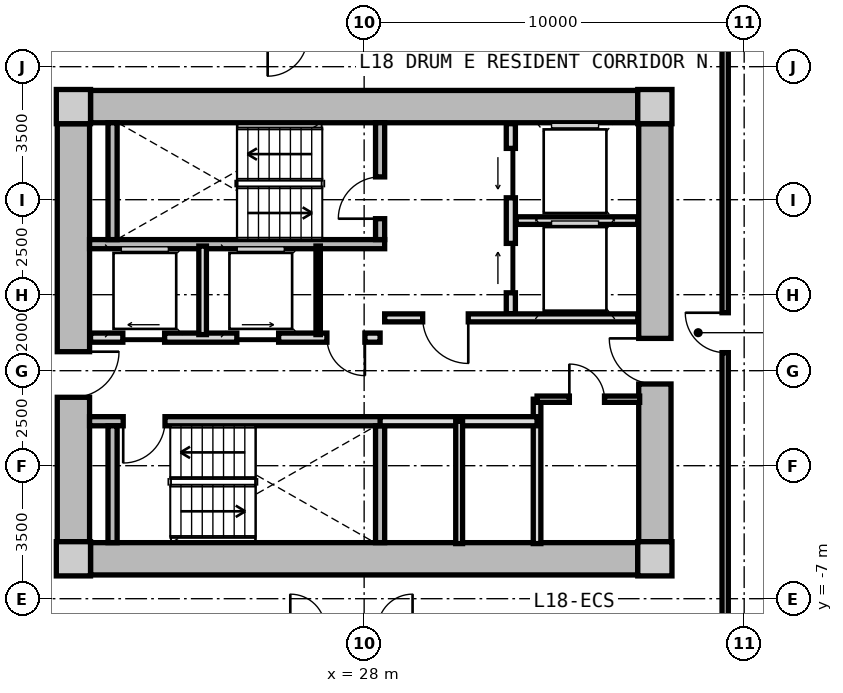
"""IFC4 building model, lengths in metres.
Left out: names, types, materials, properties, quantities, classifications, styles, units other than length and angle.
Written with IfcOpenShell. Run it as: python <this file> out.ifc"""

import sys

from ifc_helpers import new_model, si_unit, direction, frame, frame_2d, origin, origin_2d, place, context, subcontext, project, spatial, rectangle, extrude, source, transform, mapped, element, fill, save


model = new_model("IFC4")
c1 = context("Model", 3, precision=1e-05, world=origin(), true_north=direction((0.0, 1.0)))
c2 = subcontext(c1, "Body", "Model", "MODEL_VIEW")
j1 = project(units=[si_unit("LENGTHUNIT", "METRE"), si_unit("PLANEANGLEUNIT", "RADIAN")], contexts=[c1])
p1 = place(None, origin())
s1 = spatial("IfcSite", under=j1, at=p1, CompositionType="ELEMENT")
p2 = place(p1, origin())
s2 = spatial("IfcBuilding", under=s1, at=p2, CompositionType="ELEMENT")
p3 = place(p2, frame((0.0, 0.0, 61.25)))
s3 = spatial("IfcBuildingStorey", under=s2, at=p3, CompositionType="ELEMENT", Elevation=61.25)
m1 = source(origin(), c2, "Body", "SweptSolid", [
    extrude(rectangle(XDim=0.9, YDim=0.9, at=origin_2d()), origin(), (0.0, 0.0, 1.0), 3.05),
])
for number, where, z_axis, x_axis in (
    (1, (20.35, -5.95, 0.0), (0.0, 0.0, 1.0), (1.0, 0.0, 0.0)),
    (2, (35.65, -5.95, 0.0), (0.0, 0.0, 1.0), (1.0, 0.0, 0.0)),
    (3, (35.65, 5.95, 0.0), (0.0, 0.0, 1.0), (1.0, 0.0, 0.0)),
    (4, (20.35, 5.95, 0.0), (0.0, 0.0, 1.0), (1.0, 0.0, 0.0)),
):
    element("IfcColumn", number, at=place(p3, frame(where, z_axis=z_axis, x_axis=x_axis)), inside=s3, PredefinedType="COLUMN", context=c2, shape_type="MappedRepresentation", body=[
        mapped(m1, transform((0.0, 0.0, 0.0), x_axis=(1.0, 0.0, 0.0), y_axis=(0.0, 1.0, 0.0), z_axis=(0.0, 0.0, 1.0), scale=1.0)),
    ])
m2 = source(origin(), c2, "Body", "SweptSolid", [
    extrude(rectangle(XDim=14.4, YDim=0.85, at=frame_2d((7.2, 0.0))), origin(), (0.0, 0.0, 1.0), 2.79),
])
for number, where, z_axis, x_axis in (
    (5, (20.8, 5.95, 0.0), (0.0, 0.0, 1.0), (1.0, 0.0, 0.0)),
    (6, (35.2, -5.95, 0.0), (0.0, 0.0, 1.0), (-1.0, 0.0, 0.0)),
):
    element("IfcWall", number, at=place(p3, frame(where, z_axis=z_axis, x_axis=x_axis)), inside=s3, PredefinedType="SHEAR", context=c2, shape_type="MappedRepresentation", body=[
        mapped(m2, transform((0.0, 0.0, 0.0), x_axis=(1.0, 0.0, 0.0), y_axis=(0.0, 1.0, 0.0), z_axis=(0.0, 0.0, 1.0), scale=1.0)),
    ])
m3 = source(origin(), c2, "Body", "SweptSolid", [
    extrude(rectangle(XDim=11.0, YDim=0.85, at=frame_2d((5.5, 0.0))), origin(), (0.0, 0.0, 1.0), 2.79),
])
p4 = place(p3, frame((20.35, -5.5, 0.0), z_axis=(0.0, 0.0, 1.0), x_axis=(0.0, 1.0, 0.0)))
e7 = element("IfcWall", 7, at=p4, inside=s3, PredefinedType="SHEAR", context=c2, shape_type="MappedRepresentation", body=[
    mapped(m3, transform((0.0, 0.0, 0.0), x_axis=(1.0, 0.0, 0.0), y_axis=(0.0, 1.0, 0.0), z_axis=(0.0, 0.0, 1.0), scale=1.0)),
])
p5 = place(p4, frame((3.8, 0.0, 0.0)))
e8 = element("IfcOpeningElement", 8, at=p5, cuts=e7, PredefinedType="OPENING", context=c2, shape_type="SweptSolid", body=[
    extrude(rectangle(XDim=1.2, YDim=2.15, at=frame_2d((0.6, 1.075))), frame((0.0, 0.435, 0.0), z_axis=(0.0, -1.0, 0.0), x_axis=(1.0, 0.0, 0.0)), (0.0, 0.0, 1.0), 0.87),
])
p6 = place(p3, frame((35.65, 5.5, 0.0), z_axis=(0.0, 0.0, 1.0), x_axis=(0.0, -1.0, 0.0)))
e9 = element("IfcWall", 9, at=p6, inside=s3, PredefinedType="SHEAR", context=c2, shape_type="MappedRepresentation", body=[
    mapped(m3, transform((0.0, 0.0, 0.0), x_axis=(1.0, 0.0, 0.0), y_axis=(0.0, 1.0, 0.0), z_axis=(0.0, 0.0, 1.0), scale=1.0)),
])
p7 = place(p6, frame((5.65, 0.0, 0.0)))
e10 = element("IfcOpeningElement", 10, at=p7, cuts=e9, PredefinedType="OPENING", context=c2, shape_type="SweptSolid", body=[
    extrude(rectangle(XDim=1.2, YDim=2.15, at=frame_2d((0.6, 1.075))), frame((0.0, 0.435, 0.0), z_axis=(0.0, -1.0, 0.0), x_axis=(1.0, 0.0, 0.0)), (0.0, 0.0, 1.0), 0.87),
])
m4 = source(origin(), c2, "Body", "SweptSolid", [
    extrude(rectangle(XDim=7.765, YDim=0.24, at=frame_2d((3.883, 0.0))), origin(), (0.0, 0.0, 1.0), 2.79),
])
p8 = place(p3, frame((20.775, 2.33, 0.0), z_axis=(0.0, 0.0, 1.0), x_axis=(1.0, 0.0, 0.0)))
e11 = element("IfcWall", 11, at=p8, inside=s3, PredefinedType="PARTITIONING", context=c2, shape_type="MappedRepresentation", body=[
    mapped(m4, transform((0.0, 0.0, 0.0), x_axis=(1.0, 0.0, 0.0), y_axis=(0.0, 1.0, 0.0), z_axis=(0.0, 0.0, 1.0), scale=1.0)),
])
m5 = source(origin(), c2, "Body", "SweptSolid", [
    extrude(rectangle(XDim=3.075, YDim=0.24, at=frame_2d((1.538, 0.0))), origin(), (0.0, 0.0, 1.0), 2.79),
])
p9 = place(p3, frame((21.38, 2.45, 0.0), z_axis=(0.0, 0.0, 1.0), x_axis=(0.0, 1.0, 0.0)))
e12 = element("IfcWall", 12, at=p9, inside=s3, PredefinedType="PARTITIONING", context=c2, shape_type="MappedRepresentation", body=[
    mapped(m5, transform((0.0, 0.0, 0.0), x_axis=(1.0, 0.0, 0.0), y_axis=(0.0, 1.0, 0.0), z_axis=(0.0, 0.0, 1.0), scale=1.0)),
])
p10 = place(p3, frame((28.42, 2.45, 0.0), z_axis=(0.0, 0.0, 1.0), x_axis=(0.0, 1.0, 0.0)))
e13 = element("IfcWall", 13, at=p10, inside=s3, PredefinedType="PARTITIONING", context=c2, shape_type="MappedRepresentation", body=[
    mapped(m5, transform((0.0, 0.0, 0.0), x_axis=(1.0, 0.0, 0.0), y_axis=(0.0, 1.0, 0.0), z_axis=(0.0, 0.0, 1.0), scale=1.0)),
])
p11 = place(p10, frame((0.55, 0.0, 0.0)))
e14 = element("IfcOpeningElement", 14, at=p11, cuts=e13, PredefinedType="OPENING", context=c2, shape_type="SweptSolid", body=[
    extrude(rectangle(XDim=1.1, YDim=2.15, at=frame_2d((0.55, 1.075))), frame((0.0, 0.13, 0.0), z_axis=(0.0, -1.0, 0.0), x_axis=(1.0, 0.0, 0.0)), (0.0, 0.0, 1.0), 0.26),
])
p12 = place(p3, frame((20.775, -2.33, 0.0), z_axis=(0.0, 0.0, 1.0), x_axis=(1.0, 0.0, 0.0)))
e15 = element("IfcWall", 15, at=p12, inside=s3, PredefinedType="PARTITIONING", context=c2, shape_type="MappedRepresentation", body=[
    mapped(m4, transform((0.0, 0.0, 0.0), x_axis=(1.0, 0.0, 0.0), y_axis=(0.0, 1.0, 0.0), z_axis=(0.0, 0.0, 1.0), scale=1.0)),
])
p13 = place(p12, frame((0.885, 0.0, 0.0)))
e16 = element("IfcOpeningElement", 16, at=p13, cuts=e15, PredefinedType="OPENING", context=c2, shape_type="SweptSolid", body=[
    extrude(rectangle(XDim=1.1, YDim=2.15, at=frame_2d((0.55, 1.075))), frame((0.0, 0.13, 0.0), z_axis=(0.0, -1.0, 0.0), x_axis=(1.0, 0.0, 0.0)), (0.0, 0.0, 1.0), 0.26),
])
for number, where, z_axis, x_axis in (
    (17, (21.38, -5.525, 0.0), (0.0, 0.0, 1.0), (0.0, 1.0, 0.0)),
    (18, (28.42, -5.525, 0.0), (0.0, 0.0, 1.0), (0.0, 1.0, 0.0)),
):
    element("IfcWall", number, at=place(p3, frame(where, z_axis=z_axis, x_axis=x_axis)), inside=s3, PredefinedType="PARTITIONING", context=c2, shape_type="MappedRepresentation", body=[
        mapped(m5, transform((0.0, 0.0, 0.0), x_axis=(1.0, 0.0, 0.0), y_axis=(0.0, 1.0, 0.0), z_axis=(0.0, 0.0, 1.0), scale=1.0)),
    ])
m6 = source(origin(), c2, "Body", "SweptSolid", [
    extrude(rectangle(XDim=5.0, YDim=0.24, at=frame_2d((2.5, 0.0))), origin(), (0.0, 0.0, 1.0), 2.775),
])
p14 = place(p3, frame((31.86, 0.5, 0.0), z_axis=(0.0, 0.0, 1.0), x_axis=(0.0, 1.0, 0.0)))
e19 = element("IfcWall", 19, at=p14, inside=s3, PredefinedType="PARTITIONING", context=c2, shape_type="MappedRepresentation", body=[
    mapped(m6, transform((0.0, 0.0, 0.0), x_axis=(1.0, 0.0, 0.0), y_axis=(0.0, 1.0, 0.0), z_axis=(0.0, 0.0, 1.0), scale=1.0)),
])
p15 = place(p14, frame((3.05, 0.0, 0.0)))
e20 = element("IfcOpeningElement", 20, at=p15, cuts=e19, PredefinedType="OPENING", context=c2, shape_type="SweptSolid", body=[
    extrude(rectangle(XDim=1.3, YDim=2.2, at=frame_2d((0.65, 1.1))), frame((0.0, 0.13, 0.0), z_axis=(0.0, -1.0, 0.0), x_axis=(1.0, 0.0, 0.0)), (0.0, 0.0, 1.0), 0.26),
])
p16 = place(p14, frame((0.55, 0.0, 0.0)))
e21 = element("IfcOpeningElement", 21, at=p16, cuts=e19, PredefinedType="OPENING", context=c2, shape_type="SweptSolid", body=[
    extrude(rectangle(XDim=1.3, YDim=2.2, at=frame_2d((0.65, 1.1))), frame((0.0, 0.13, 0.0), z_axis=(0.0, -1.0, 0.0), x_axis=(1.0, 0.0, 0.0)), (0.0, 0.0, 1.0), 0.26),
])
m7 = source(origin(), c2, "Body", "SweptSolid", [
    extrude(rectangle(XDim=3.2, YDim=0.2, at=frame_2d((1.6, 0.0))), origin(), (0.0, 0.0, 1.0), 2.775),
])
p17 = place(p3, frame((32.0, 2.95, 0.0), z_axis=(0.0, 0.0, 1.0), x_axis=(1.0, 0.0, 0.0)))
e22 = element("IfcWall", 22, at=p17, inside=s3, PredefinedType="PARTITIONING", context=c2, shape_type="MappedRepresentation", body=[
    mapped(m7, transform((0.0, 0.0, 0.0), x_axis=(1.0, 0.0, 0.0), y_axis=(0.0, 1.0, 0.0), z_axis=(0.0, 0.0, 1.0), scale=1.0)),
])
m8 = source(origin(), c2, "Body", "SweptSolid", [
    extrude(rectangle(XDim=6.66, YDim=0.21, at=frame_2d((3.33, 0.0))), origin(), (0.0, 0.0, 1.0), 2.775),
])
p18 = place(p3, frame((28.54, 0.39, 0.0), z_axis=(0.0, 0.0, 1.0), x_axis=(1.0, 0.0, 0.0)))
e23 = element("IfcWall", 23, at=p18, inside=s3, PredefinedType="PARTITIONING", context=c2, shape_type="MappedRepresentation", body=[
    mapped(m8, transform((0.0, 0.0, 0.0), x_axis=(1.0, 0.0, 0.0), y_axis=(0.0, 1.0, 0.0), z_axis=(0.0, 0.0, 1.0), scale=1.0)),
])
p19 = place(p18, frame((1.0, 0.0, 0.0)))
e24 = element("IfcOpeningElement", 24, at=p19, cuts=e23, PredefinedType="OPENING", context=c2, shape_type="SweptSolid", body=[
    extrude(rectangle(XDim=1.2, YDim=2.15, at=frame_2d((0.6, 1.075))), frame((0.0, 0.115, 0.0), z_axis=(0.0, -1.0, 0.0), x_axis=(1.0, 0.0, 0.0)), (0.0, 0.0, 1.0), 0.23),
])
m9 = source(origin(), c2, "Body", "SweptSolid", [
    extrude(rectangle(XDim=7.62, YDim=0.24, at=frame_2d((3.81, 0.0))), origin(), (0.0, 0.0, 1.0), 2.775),
])
p20 = place(p3, frame((20.8, -0.13, 0.0), z_axis=(0.0, 0.0, 1.0), x_axis=(1.0, 0.0, 0.0)))
e25 = element("IfcWall", 25, at=p20, inside=s3, PredefinedType="PARTITIONING", context=c2, shape_type="MappedRepresentation", body=[
    mapped(m9, transform((0.0, 0.0, 0.0), x_axis=(1.0, 0.0, 0.0), y_axis=(0.0, 1.0, 0.0), z_axis=(0.0, 0.0, 1.0), scale=1.0)),
])
p21 = place(p20, frame((6.22, 0.0, 0.0)))
e26 = element("IfcOpeningElement", 26, at=p21, cuts=e25, PredefinedType="OPENING", context=c2, shape_type="SweptSolid", body=[
    extrude(rectangle(XDim=1.0, YDim=2.1, at=frame_2d((0.5, 1.05))), frame((0.0, 0.13, 0.0), z_axis=(0.0, -1.0, 0.0), x_axis=(1.0, 0.0, 0.0)), (0.0, 0.0, 1.0), 0.26),
])
p22 = place(p20, frame((0.85, 0.0, 0.0)))
e27 = element("IfcOpeningElement", 27, at=p22, cuts=e25, PredefinedType="OPENING", context=c2, shape_type="SweptSolid", body=[
    extrude(rectangle(XDim=1.1, YDim=2.2, at=frame_2d((0.55, 1.1))), frame((0.0, 0.13, 0.0), z_axis=(0.0, -1.0, 0.0), x_axis=(1.0, 0.0, 0.0)), (0.0, 0.0, 1.0), 0.26),
])
p23 = place(p20, frame((3.85, 0.0, 0.0)))
e28 = element("IfcOpeningElement", 28, at=p23, cuts=e25, PredefinedType="OPENING", context=c2, shape_type="SweptSolid", body=[
    extrude(rectangle(XDim=1.1, YDim=2.2, at=frame_2d((0.55, 1.1))), frame((0.0, 0.13, 0.0), z_axis=(0.0, -1.0, 0.0), x_axis=(1.0, 0.0, 0.0)), (0.0, 0.0, 1.0), 0.26),
])
m10 = source(origin(), c2, "Body", "SweptSolid", [
    extrude(rectangle(XDim=2.33, YDim=0.115, at=frame_2d((1.165, 0.0))), origin(), (0.0, 0.0, 1.0), 2.775),
])
p24 = place(p3, frame((26.79, -0.05, 0.0), z_axis=(0.0, 0.0, 1.0), x_axis=(0.0, 1.0, 0.0)))
e29 = element("IfcWall", 29, at=p24, inside=s3, PredefinedType="PARTITIONING", context=c2, shape_type="MappedRepresentation", body=[
    mapped(m10, transform((0.0, 0.0, 0.0), x_axis=(1.0, 0.0, 0.0), y_axis=(0.0, 1.0, 0.0), z_axis=(0.0, 0.0, 1.0), scale=1.0)),
])
m11 = source(origin(), c2, "Body", "SweptSolid", [
    extrude(rectangle(XDim=2.33, YDim=0.2, at=frame_2d((1.165, 0.0))), origin(), (0.0, 0.0, 1.0), 2.775),
])
p25 = place(p3, frame((23.75, -0.05, 0.0), z_axis=(0.0, 0.0, 1.0), x_axis=(0.0, 1.0, 0.0)))
e30 = element("IfcWall", 30, at=p25, inside=s3, PredefinedType="PARTITIONING", context=c2, shape_type="MappedRepresentation", body=[
    mapped(m11, transform((0.0, 0.0, 0.0), x_axis=(1.0, 0.0, 0.0), y_axis=(0.0, 1.0, 0.0), z_axis=(0.0, 0.0, 1.0), scale=1.0)),
])
m12 = source(origin(), c2, "Body", "SweptSolid", [
    extrude(rectangle(XDim=3.8, YDim=0.2, at=frame_2d((1.9, 0.0))), origin(), (0.0, 0.0, 1.0), 2.775),
])
p26 = place(p3, frame((32.55, -5.55, 0.0), z_axis=(0.0, 0.0, 1.0), x_axis=(0.0, 1.0, 0.0)))
e31 = element("IfcWall", 31, at=p26, inside=s3, PredefinedType="PARTITIONING", context=c2, shape_type="MappedRepresentation", body=[
    mapped(m12, transform((0.0, 0.0, 0.0), x_axis=(1.0, 0.0, 0.0), y_axis=(0.0, 1.0, 0.0), z_axis=(0.0, 0.0, 1.0), scale=1.0)),
])
m13 = source(origin(), c2, "Body", "SweptSolid", [
    extrude(rectangle(XDim=4.13, YDim=0.24, at=frame_2d((2.065, 0.0))), origin(), (0.0, 0.0, 1.0), 2.775),
])
p27 = place(p3, frame((28.42, -2.33, 0.0), z_axis=(0.0, 0.0, 1.0), x_axis=(1.0, 0.0, 0.0)))
e32 = element("IfcWall", 32, at=p27, inside=s3, PredefinedType="PARTITIONING", context=c2, shape_type="MappedRepresentation", body=[
    mapped(m13, transform((0.0, 0.0, 0.0), x_axis=(1.0, 0.0, 0.0), y_axis=(0.0, 1.0, 0.0), z_axis=(0.0, 0.0, 1.0), scale=1.0)),
])
m14 = source(origin(), c2, "Body", "SweptSolid", [
    extrude(rectangle(XDim=3.22, YDim=0.18, at=frame_2d((1.61, 0.0))), origin(), (0.0, 0.0, 1.0), 2.775),
])
p28 = place(p3, frame((30.5, -5.55, 0.0), z_axis=(0.0, 0.0, 1.0), x_axis=(0.0, 1.0, 0.0)))
e33 = element("IfcWall", 33, at=p28, inside=s3, PredefinedType="PARTITIONING", context=c2, shape_type="MappedRepresentation", body=[
    mapped(m14, transform((0.0, 0.0, 0.0), x_axis=(1.0, 0.0, 0.0), y_axis=(0.0, 1.0, 0.0), z_axis=(0.0, 0.0, 1.0), scale=1.0)),
])
m15 = source(origin(), c2, "Body", "SweptSolid", [
    extrude(rectangle(XDim=2.7, YDim=0.165, at=frame_2d((1.35, 0.0))), origin(), (0.0, 0.0, 1.0), 2.775),
])
p29 = place(p3, frame((32.55, -1.75, 0.0), z_axis=(0.0, 0.0, 1.0), x_axis=(1.0, 0.0, 0.0)))
e34 = element("IfcWall", 34, at=p29, inside=s3, PredefinedType="PARTITIONING", context=c2, shape_type="MappedRepresentation", body=[
    mapped(m15, transform((0.0, 0.0, 0.0), x_axis=(1.0, 0.0, 0.0), y_axis=(0.0, 1.0, 0.0), z_axis=(0.0, 0.0, 1.0), scale=1.0)),
])
p30 = place(p29, frame((0.85, 0.0, 0.0)))
e35 = element("IfcOpeningElement", 35, at=p30, cuts=e34, PredefinedType="OPENING", context=c2, shape_type="SweptSolid", body=[
    extrude(rectangle(XDim=0.925, YDim=2.1, at=frame_2d((0.462, 1.05))), frame((0.0, 0.093, 0.0), z_axis=(0.0, -1.0, 0.0), x_axis=(1.0, 0.0, 0.0)), (0.0, 0.0, 1.0), 0.185),
])
m16 = source(origin(), c2, "Body", "SweptSolid", [
    extrude(rectangle(XDim=15.6, YDim=0.165, at=frame_2d((7.8, 0.0))), origin(), (0.0, 0.0, 1.0), 2.775),
])
p31 = place(p3, frame((37.5, 7.8, 0.0), z_axis=(0.0, 0.0, 1.0), x_axis=(0.0, -1.0, 0.0)))
e36 = element("IfcWall", 36, at=p31, inside=s3, PredefinedType="PARTITIONING", context=c2, shape_type="MappedRepresentation", body=[
    mapped(m16, transform((0.0, 0.0, 0.0), x_axis=(1.0, 0.0, 0.0), y_axis=(0.0, 1.0, 0.0), z_axis=(0.0, 0.0, 1.0), scale=1.0)),
])
p32 = place(p31, frame((7.275, 0.0, 0.0)))
e37 = element("IfcOpeningElement", 37, at=p32, cuts=e36, PredefinedType="OPENING", context=c2, shape_type="SweptSolid", body=[
    extrude(rectangle(XDim=1.05, YDim=2.15, at=frame_2d((0.525, 1.075))), frame((0.0, 0.093, 0.0), z_axis=(0.0, -1.0, 0.0), x_axis=(1.0, 0.0, 0.0)), (0.0, 0.0, 1.0), 0.185),
])
m17 = source(origin(), c2, "Body", "SweptSolid", [
    extrude(rectangle(XDim=1.1, YDim=2.15, at=frame_2d((0.55, 1.075))), frame((0.0, 0.025, 0.0), z_axis=(0.0, -1.0, 0.0), x_axis=(1.0, 0.0, 0.0)), (0.0, 0.0, 1.0), 0.05),
])
p33 = place(p11, origin())
e38 = element("IfcDoor", 38, at=p33, inside=s3, OperationType="SINGLE_SWING_LEFT", PredefinedType="DOOR", context=c2, shape_type="MappedRepresentation", body=[
    mapped(m17, transform((0.0, 0.0, 0.0), x_axis=(1.0, 0.0, 0.0), y_axis=(0.0, 1.0, 0.0), z_axis=(0.0, 0.0, 1.0), scale=1.0)),
])
fill(e14, e38)
p34 = place(p13, frame((1.1, 0.0, 0.0), z_axis=(0.0, 0.0, 1.0), x_axis=(-1.0, 0.0, 0.0)))
e39 = element("IfcDoor", 39, at=p34, inside=s3, OperationType="SINGLE_SWING_RIGHT", PredefinedType="DOOR", context=c2, shape_type="MappedRepresentation", body=[
    mapped(m17, transform((0.0, 0.0, 0.0), x_axis=(1.0, 0.0, 0.0), y_axis=(0.0, 1.0, 0.0), z_axis=(0.0, 0.0, 1.0), scale=1.0)),
])
fill(e16, e39)
m18 = source(origin(), c2, "Body", "SweptSolid", [
    extrude(rectangle(XDim=1.3, YDim=2.2, at=frame_2d((0.65, 1.1))), frame((0.0, 0.025, 0.0), z_axis=(0.0, -1.0, 0.0), x_axis=(1.0, 0.0, 0.0)), (0.0, 0.0, 1.0), 0.05),
])
p35 = place(p15, origin())
e40 = element("IfcDoor", 40, at=p35, inside=s3, OperationType="SLIDING_TO_LEFT", PredefinedType="DOOR", context=c2, shape_type="MappedRepresentation", body=[
    mapped(m18, transform((0.0, 0.0, 0.0), x_axis=(1.0, 0.0, 0.0), y_axis=(0.0, 1.0, 0.0), z_axis=(0.0, 0.0, 1.0), scale=1.0)),
])
fill(e20, e40)
p36 = place(p16, origin())
e41 = element("IfcDoor", 41, at=p36, inside=s3, OperationType="SLIDING_TO_RIGHT", PredefinedType="DOOR", context=c2, shape_type="MappedRepresentation", body=[
    mapped(m18, transform((0.0, 0.0, 0.0), x_axis=(1.0, 0.0, 0.0), y_axis=(0.0, 1.0, 0.0), z_axis=(0.0, 0.0, 1.0), scale=1.0)),
])
fill(e21, e41)
m19 = source(origin(), c2, "Body", "SweptSolid", [
    extrude(rectangle(XDim=1.2, YDim=2.15, at=frame_2d((0.6, 1.075))), frame((0.0, 0.025, 0.0), z_axis=(0.0, -1.0, 0.0), x_axis=(1.0, 0.0, 0.0)), (0.0, 0.0, 1.0), 0.05),
])
p37 = place(p19, frame((1.2, 0.0, 0.0), z_axis=(0.0, 0.0, 1.0), x_axis=(-1.0, 0.0, 0.0)))
e42 = element("IfcDoor", 42, at=p37, inside=s3, OperationType="SINGLE_SWING_LEFT", PredefinedType="DOOR", context=c2, shape_type="MappedRepresentation", body=[
    mapped(m19, transform((0.0, 0.0, 0.0), x_axis=(1.0, 0.0, 0.0), y_axis=(0.0, 1.0, 0.0), z_axis=(0.0, 0.0, 1.0), scale=1.0)),
])
fill(e24, e42)
p38 = place(p5, frame((1.2, 0.0, 0.0), z_axis=(0.0, 0.0, 1.0), x_axis=(-1.0, 0.0, 0.0)))
e43 = element("IfcDoor", 43, at=p38, inside=s3, OperationType="SINGLE_SWING_LEFT", PredefinedType="DOOR", context=c2, shape_type="MappedRepresentation", body=[
    mapped(m19, transform((0.0, 0.0, 0.0), x_axis=(1.0, 0.0, 0.0), y_axis=(0.0, 1.0, 0.0), z_axis=(0.0, 0.0, 1.0), scale=1.0)),
])
fill(e8, e43)
p39 = place(p7, frame((1.2, 0.0, 0.0), z_axis=(0.0, 0.0, 1.0), x_axis=(-1.0, 0.0, 0.0)))
e44 = element("IfcDoor", 44, at=p39, inside=s3, OperationType="SINGLE_SWING_RIGHT", PredefinedType="DOOR", context=c2, shape_type="MappedRepresentation", body=[
    mapped(m19, transform((0.0, 0.0, 0.0), x_axis=(1.0, 0.0, 0.0), y_axis=(0.0, 1.0, 0.0), z_axis=(0.0, 0.0, 1.0), scale=1.0)),
])
fill(e10, e44)
m20 = source(origin(), c2, "Body", "SweptSolid", [
    extrude(rectangle(XDim=1.0, YDim=2.1, at=frame_2d((0.5, 1.05))), frame((0.0, 0.025, 0.0), z_axis=(0.0, -1.0, 0.0), x_axis=(1.0, 0.0, 0.0)), (0.0, 0.0, 1.0), 0.05),
])
p40 = place(p21, frame((1.0, 0.0, 0.0), z_axis=(0.0, 0.0, 1.0), x_axis=(-1.0, 0.0, 0.0)))
e45 = element("IfcDoor", 45, at=p40, inside=s3, OperationType="SINGLE_SWING_LEFT", PredefinedType="DOOR", context=c2, shape_type="MappedRepresentation", body=[
    mapped(m20, transform((0.0, 0.0, 0.0), x_axis=(1.0, 0.0, 0.0), y_axis=(0.0, 1.0, 0.0), z_axis=(0.0, 0.0, 1.0), scale=1.0)),
])
fill(e26, e45)
m21 = source(origin(), c2, "Body", "SweptSolid", [
    extrude(rectangle(XDim=1.1, YDim=2.2, at=frame_2d((0.55, 1.1))), frame((0.0, 0.025, 0.0), z_axis=(0.0, -1.0, 0.0), x_axis=(1.0, 0.0, 0.0)), (0.0, 0.0, 1.0), 0.05),
])
p41 = place(p22, origin())
e46 = element("IfcDoor", 46, at=p41, inside=s3, OperationType="SLIDING_TO_LEFT", PredefinedType="DOOR", context=c2, shape_type="MappedRepresentation", body=[
    mapped(m21, transform((0.0, 0.0, 0.0), x_axis=(1.0, 0.0, 0.0), y_axis=(0.0, 1.0, 0.0), z_axis=(0.0, 0.0, 1.0), scale=1.0)),
])
fill(e27, e46)
p42 = place(p23, origin())
e47 = element("IfcDoor", 47, at=p42, inside=s3, OperationType="SLIDING_TO_RIGHT", PredefinedType="DOOR", context=c2, shape_type="MappedRepresentation", body=[
    mapped(m21, transform((0.0, 0.0, 0.0), x_axis=(1.0, 0.0, 0.0), y_axis=(0.0, 1.0, 0.0), z_axis=(0.0, 0.0, 1.0), scale=1.0)),
])
fill(e28, e47)
m22 = source(origin(), c2, "Body", "SweptSolid", [
    extrude(rectangle(XDim=0.925, YDim=2.1, at=frame_2d((0.462, 1.05))), frame((0.0, 0.025, 0.0), z_axis=(0.0, -1.0, 0.0), x_axis=(1.0, 0.0, 0.0)), (0.0, 0.0, 1.0), 0.05),
])
p43 = place(p30, origin())
e48 = element("IfcDoor", 48, at=p43, inside=s3, OperationType="SINGLE_SWING_LEFT", PredefinedType="DOOR", context=c2, shape_type="MappedRepresentation", body=[
    mapped(m22, transform((0.0, 0.0, 0.0), x_axis=(1.0, 0.0, 0.0), y_axis=(0.0, 1.0, 0.0), z_axis=(0.0, 0.0, 1.0), scale=1.0)),
])
fill(e35, e48)
m23 = source(origin(), c2, "Body", "SweptSolid", [
    extrude(rectangle(XDim=1.05, YDim=2.15, at=frame_2d((0.525, 1.075))), frame((0.0, 0.025, 0.0), z_axis=(0.0, -1.0, 0.0), x_axis=(1.0, 0.0, 0.0)), (0.0, 0.0, 1.0), 0.05),
])
p44 = place(p32, frame((1.05, 0.0, 0.0), z_axis=(0.0, 0.0, 1.0), x_axis=(-1.0, 0.0, 0.0)))
e49 = element("IfcDoor", 49, at=p44, inside=s3, OperationType="SINGLE_SWING_RIGHT", PredefinedType="DOOR", context=c2, shape_type="MappedRepresentation", body=[
    mapped(m23, transform((0.0, 0.0, 0.0), x_axis=(1.0, 0.0, 0.0), y_axis=(0.0, 1.0, 0.0), z_axis=(0.0, 0.0, 1.0), scale=1.0)),
])
fill(e37, e49)
save(model, sys.argv[1])
